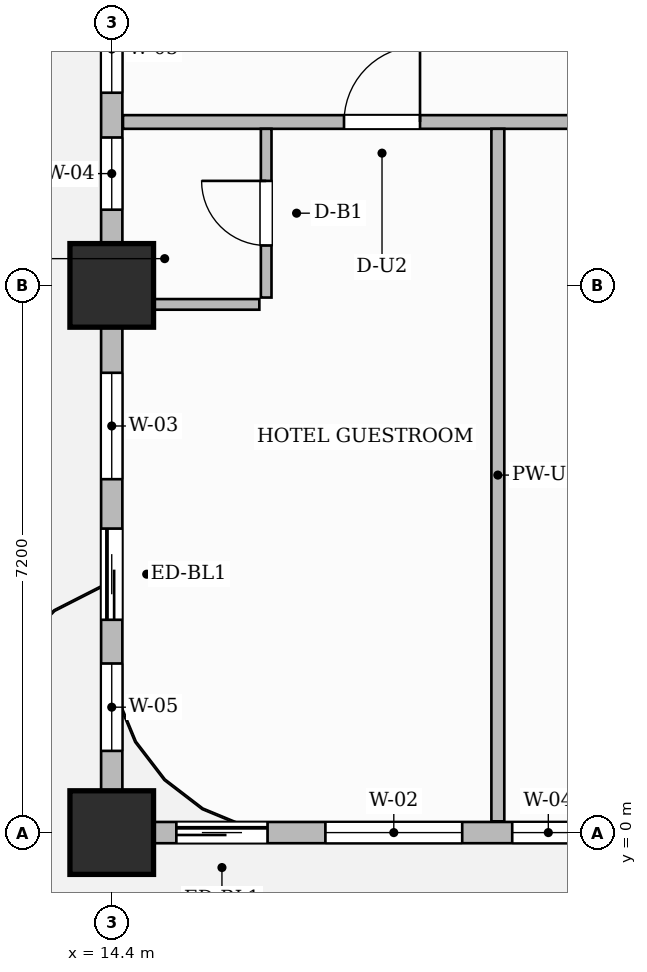
"""IFC4 building model, lengths in metres.
Left out: names, types, materials, properties, quantities, classifications, styles, units other than length and angle.
Written with IfcOpenShell. Run it as: python <this file> out.ifc"""

import sys

from ifc_helpers import new_model, si_unit, direction, frame, frame_2d, origin, origin_2d, place, context, subcontext, project, spatial, rectangle, extrude, source, transform, mapped, element, fill, save


model = new_model("IFC4")
c1 = context("Model", 3, precision=1e-05, world=origin(), true_north=direction((0.0, 1.0)))
c2 = subcontext(c1, "Body", "Model", "MODEL_VIEW")
j1 = project(units=[si_unit("LENGTHUNIT", "METRE"), si_unit("PLANEANGLEUNIT", "RADIAN")], contexts=[c1])
p1 = place(None, origin())
s1 = spatial("IfcSite", under=j1, at=p1, CompositionType="ELEMENT")
p2 = place(p1, origin())
s2 = spatial("IfcBuilding", under=s1, at=p2, CompositionType="ELEMENT")
p3 = place(p2, frame((0.0, 0.0, 80.5)))
s3 = spatial("IfcBuildingStorey", under=s2, at=p3, CompositionType="ELEMENT", Elevation=80.5)
m1 = source(origin(), c2, "Body", "SweptSolid", [
    extrude(rectangle(XDim=1.1, YDim=1.1, at=origin_2d()), origin(), (0.0, 0.0, 1.0), 3.7),
])
for number, where, z_axis, x_axis in (
    (1, (14.4, 0.0, 0.0), (0.0, 0.0, 1.0), (1.0, 0.0, 0.0)),
    (2, (14.4, 7.2, 0.0), (0.0, 0.0, 1.0), (1.0, 0.0, 0.0)),
):
    element("IfcColumn", number, at=place(p3, frame(where, z_axis=z_axis, x_axis=x_axis)), inside=s3, PredefinedType="COLUMN", context=c2, shape_type="MappedRepresentation", body=[
        mapped(m1, transform((0.0, 0.0, 0.0), scale=1.0)),
    ])
p4 = place(p3, frame((14.548, 9.35, 0.0), z_axis=(0.0, 0.0, 1.0), x_axis=(1.0, 0.0, 0.0)))
e3 = element("IfcWall", 3, at=p4, inside=s3, PredefinedType="PARTITIONING", context=c2, shape_type="SweptSolid", body=[
    extrude(rectangle(XDim=15.562, YDim=0.18, at=frame_2d((7.781, 0.0))), origin(), (0.0, 0.0, 1.0), 3.45),
])
p5 = place(p4, frame((2.908, 0.0, 0.0)))
e4 = element("IfcOpeningElement", 4, at=p5, cuts=e3, PredefinedType="OPENING", context=c2, shape_type="SweptSolid", body=[
    extrude(rectangle(XDim=1.0, YDim=2.2, at=frame_2d((0.5, 1.1))), frame((0.0, 0.1, 0.0), z_axis=(0.0, -1.0, 0.0), x_axis=(1.0, 0.0, 0.0)), (0.0, 0.0, 1.0), 0.2),
])
p6 = place(p4, frame((5.985, 0.0, 0.0)))
e5 = element("IfcOpeningElement", 5, at=p6, cuts=e3, PredefinedType="OPENING", context=c2, shape_type="SweptSolid", body=[
    extrude(rectangle(XDim=1.05, YDim=2.25, at=frame_2d((0.525, 1.125))), frame((0.0, 0.1, 0.0), z_axis=(0.0, -1.0, 0.0), x_axis=(1.0, 0.0, 0.0)), (0.0, 0.0, 1.0), 0.2),
])
p7 = place(p4, frame((13.72, 0.0, 0.0)))
e6 = element("IfcOpeningElement", 6, at=p7, cuts=e3, PredefinedType="OPENING", context=c2, shape_type="SweptSolid", body=[
    extrude(rectangle(XDim=1.0, YDim=2.2, at=frame_2d((0.5, 1.1))), frame((0.0, 0.1, 0.0), z_axis=(0.0, -1.0, 0.0), x_axis=(1.0, 0.0, 0.0)), (0.0, 0.0, 1.0), 0.2),
])
p8 = place(p3, frame((19.48, 0.148, 0.0), z_axis=(0.0, 0.0, 1.0), x_axis=(0.0, 1.0, 0.0)))
e7 = element("IfcWall", 7, at=p8, inside=s3, PredefinedType="PARTITIONING", context=c2, shape_type="SweptSolid", body=[
    extrude(rectangle(XDim=9.112, YDim=0.17, at=frame_2d((4.556, 0.0))), origin(), (0.0, 0.0, 1.0), 3.45),
])
p9 = place(p3, frame((16.432, 7.04, 0.0), z_axis=(0.0, 0.0, 1.0), x_axis=(0.0, 1.0, 0.0)))
e8 = element("IfcWall", 8, at=p9, inside=s3, PredefinedType="PARTITIONING", context=c2, shape_type="SweptSolid", body=[
    extrude(rectangle(XDim=2.22, YDim=0.14, at=frame_2d((1.11, 0.0))), origin(), (0.0, 0.0, 1.0), 3.45),
])
p10 = place(p9, frame((0.685, 0.0, 0.0)))
e9 = element("IfcOpeningElement", 9, at=p10, cuts=e8, PredefinedType="OPENING", context=c2, shape_type="SweptSolid", body=[
    extrude(rectangle(XDim=0.85, YDim=2.1, at=frame_2d((0.425, 1.05))), frame((0.0, 0.08, 0.0), z_axis=(0.0, -1.0, 0.0), x_axis=(1.0, 0.0, 0.0)), (0.0, 0.0, 1.0), 0.16),
])
p11 = place(p3, frame((14.49, 6.95, 0.0), z_axis=(0.0, 0.0, 1.0), x_axis=(1.0, 0.0, 0.0)))
e10 = element("IfcWall", 10, at=p11, inside=s3, PredefinedType="PARTITIONING", context=c2, shape_type="SweptSolid", body=[
    extrude(rectangle(XDim=1.852, YDim=0.14, at=frame_2d((0.926, 0.0))), origin(), (0.0, 0.0, 1.0), 2.885),
])
p12 = place(p3, frame((14.4, 0.0, 0.0), z_axis=(0.0, 0.0, 1.0), x_axis=(1.0, 0.0, 0.0)))
e11 = element("IfcWall", 11, at=p12, inside=s3, PredefinedType="SOLIDWALL", context=c2, shape_type="SweptSolid", body=[
    extrude(rectangle(XDim=43.2, YDim=0.28, at=frame_2d((21.6, 0.0))), origin(), (0.0, 0.0, 1.0), 2.885),
])
p13 = place(p12, frame((0.85, 0.0, 0.0)))
e12 = element("IfcOpeningElement", 12, at=p13, cuts=e11, PredefinedType="OPENING", context=c2, shape_type="SweptSolid", body=[
    extrude(rectangle(XDim=1.2, YDim=2.2, at=frame_2d((0.6, 1.1))), frame((0.0, 0.15, 0.0), z_axis=(0.0, -1.0, 0.0), x_axis=(1.0, 0.0, 0.0)), (0.0, 0.0, 1.0), 0.3),
])
p14 = place(p12, frame((2.811, 0.0, 0.8)))
e13 = element("IfcOpeningElement", 13, at=p14, cuts=e11, PredefinedType="OPENING", context=c2, shape_type="SweptSolid", body=[
    extrude(rectangle(XDim=1.8, YDim=1.85, at=frame_2d((0.9, 0.925))), frame((0.0, 0.15, 0.0), z_axis=(0.0, -1.0, 0.0), x_axis=(1.0, 0.0, 0.0)), (0.0, 0.0, 1.0), 0.3),
])
p15 = place(p12, frame((5.269, 0.0, 0.8)))
e14 = element("IfcOpeningElement", 14, at=p15, cuts=e11, PredefinedType="OPENING", context=c2, shape_type="SweptSolid", body=[
    extrude(rectangle(XDim=0.95, YDim=1.75, at=frame_2d((0.475, 0.875))), frame((0.0, 0.15, 0.0), z_axis=(0.0, -1.0, 0.0), x_axis=(1.0, 0.0, 0.0)), (0.0, 0.0, 1.0), 0.3),
])
p16 = place(p12, frame((8.389, 0.0, 0.8)))
e15 = element("IfcOpeningElement", 15, at=p16, cuts=e11, PredefinedType="OPENING", context=c2, shape_type="SweptSolid", body=[
    extrude(rectangle(XDim=1.8, YDim=1.85, at=frame_2d((0.9, 0.925))), frame((0.0, 0.15, 0.0), z_axis=(0.0, -1.0, 0.0), x_axis=(1.0, 0.0, 0.0)), (0.0, 0.0, 1.0), 0.3),
])
p17 = place(p12, frame((11.197, 0.0, 0.8)))
e16 = element("IfcOpeningElement", 16, at=p17, cuts=e11, PredefinedType="OPENING", context=c2, shape_type="SweptSolid", body=[
    extrude(rectangle(XDim=1.8, YDim=1.85, at=frame_2d((0.9, 0.925))), frame((0.0, 0.15, 0.0), z_axis=(0.0, -1.0, 0.0), x_axis=(1.0, 0.0, 0.0)), (0.0, 0.0, 1.0), 0.3),
])
p18 = place(p12, frame((16.804, 0.0, 0.8)))
e17 = element("IfcOpeningElement", 17, at=p18, cuts=e11, PredefinedType="OPENING", context=c2, shape_type="SweptSolid", body=[
    extrude(rectangle(XDim=1.8, YDim=1.85, at=frame_2d((0.9, 0.925))), frame((0.0, 0.15, 0.0), z_axis=(0.0, -1.0, 0.0), x_axis=(1.0, 0.0, 0.0)), (0.0, 0.0, 1.0), 0.3),
])
p19 = place(p12, frame((21.521, 0.0, 0.8)))
e18 = element("IfcOpeningElement", 18, at=p19, cuts=e11, PredefinedType="OPENING", context=c2, shape_type="SweptSolid", body=[
    extrude(rectangle(XDim=0.95, YDim=1.75, at=frame_2d((0.475, 0.875))), frame((0.0, 0.15, 0.0), z_axis=(0.0, -1.0, 0.0), x_axis=(1.0, 0.0, 0.0)), (0.0, 0.0, 1.0), 0.3),
])
p20 = place(p12, frame((23.904, 0.0, 0.8)))
e19 = element("IfcOpeningElement", 19, at=p20, cuts=e11, PredefinedType="OPENING", context=c2, shape_type="SweptSolid", body=[
    extrude(rectangle(XDim=1.8, YDim=1.85, at=frame_2d((0.9, 0.925))), frame((0.0, 0.15, 0.0), z_axis=(0.0, -1.0, 0.0), x_axis=(1.0, 0.0, 0.0)), (0.0, 0.0, 1.0), 0.3),
])
p21 = place(p12, frame((29.681, 0.0, 0.8)))
e20 = element("IfcOpeningElement", 20, at=p21, cuts=e11, PredefinedType="OPENING", context=c2, shape_type="SweptSolid", body=[
    extrude(rectangle(XDim=1.8, YDim=1.85, at=frame_2d((0.9, 0.925))), frame((0.0, 0.15, 0.0), z_axis=(0.0, -1.0, 0.0), x_axis=(1.0, 0.0, 0.0)), (0.0, 0.0, 1.0), 0.3),
])
p22 = place(p12, frame((32.327, 0.0, 0.8)))
e21 = element("IfcOpeningElement", 21, at=p22, cuts=e11, PredefinedType="OPENING", context=c2, shape_type="SweptSolid", body=[
    extrude(rectangle(XDim=1.8, YDim=1.85, at=frame_2d((0.9, 0.925))), frame((0.0, 0.15, 0.0), z_axis=(0.0, -1.0, 0.0), x_axis=(1.0, 0.0, 0.0)), (0.0, 0.0, 1.0), 0.3),
])
p23 = place(p12, frame((36.875, 0.0, 0.8)))
e22 = element("IfcOpeningElement", 22, at=p23, cuts=e11, PredefinedType="OPENING", context=c2, shape_type="SweptSolid", body=[
    extrude(rectangle(XDim=1.8, YDim=1.85, at=frame_2d((0.9, 0.925))), frame((0.0, 0.15, 0.0), z_axis=(0.0, -1.0, 0.0), x_axis=(1.0, 0.0, 0.0)), (0.0, 0.0, 1.0), 0.3),
])
p24 = place(p12, frame((39.925, 0.0, 0.8)))
e23 = element("IfcOpeningElement", 23, at=p24, cuts=e11, PredefinedType="OPENING", context=c2, shape_type="SweptSolid", body=[
    extrude(rectangle(XDim=1.8, YDim=1.85, at=frame_2d((0.9, 0.925))), frame((0.0, 0.15, 0.0), z_axis=(0.0, -1.0, 0.0), x_axis=(1.0, 0.0, 0.0)), (0.0, 0.0, 1.0), 0.3),
])
p25 = place(p3, frame((14.4, 0.05, 0.0), z_axis=(0.0, 0.0, 1.0), x_axis=(0.0, 1.0, 0.0)))
e24 = element("IfcWall", 24, at=p25, inside=s3, PredefinedType="SOLIDWALL", context=c2, shape_type="SweptSolid", body=[
    extrude(rectangle(XDim=20.6, YDim=0.28, at=frame_2d((10.3, 0.0))), origin(), (0.0, 0.0, 1.0), 2.885),
])
p26 = place(p25, frame((2.75, 0.0, 0.0)))
e25 = element("IfcOpeningElement", 25, at=p26, cuts=e24, PredefinedType="OPENING", context=c2, shape_type="SweptSolid", body=[
    extrude(rectangle(XDim=1.2, YDim=2.2, at=frame_2d((0.6, 1.1))), frame((0.0, 0.15, 0.0), z_axis=(0.0, -1.0, 0.0), x_axis=(1.0, 0.0, 0.0)), (0.0, 0.0, 1.0), 0.3),
])
p27 = place(p25, frame((1.025, 0.0, 0.8)))
e26 = element("IfcOpeningElement", 26, at=p27, cuts=e24, PredefinedType="OPENING", context=c2, shape_type="SweptSolid", body=[
    extrude(rectangle(XDim=1.15, YDim=1.8, at=frame_2d((0.575, 0.9))), frame((0.0, 0.15, 0.0), z_axis=(0.0, -1.0, 0.0), x_axis=(1.0, 0.0, 0.0)), (0.0, 0.0, 1.0), 0.3),
])
p28 = place(p25, frame((4.6, 0.0, 0.8)))
e27 = element("IfcOpeningElement", 27, at=p28, cuts=e24, PredefinedType="OPENING", context=c2, shape_type="SweptSolid", body=[
    extrude(rectangle(XDim=1.4, YDim=1.85, at=frame_2d((0.7, 0.925))), frame((0.0, 0.15, 0.0), z_axis=(0.0, -1.0, 0.0), x_axis=(1.0, 0.0, 0.0)), (0.0, 0.0, 1.0), 0.3),
])
p29 = place(p25, frame((8.146, 0.0, 0.8)))
e28 = element("IfcOpeningElement", 28, at=p29, cuts=e24, PredefinedType="OPENING", context=c2, shape_type="SweptSolid", body=[
    extrude(rectangle(XDim=0.95, YDim=1.75, at=frame_2d((0.475, 0.875))), frame((0.0, 0.15, 0.0), z_axis=(0.0, -1.0, 0.0), x_axis=(1.0, 0.0, 0.0)), (0.0, 0.0, 1.0), 0.3),
])
p30 = place(p25, frame((9.685, 0.0, 0.8)))
e29 = element("IfcOpeningElement", 29, at=p30, cuts=e24, PredefinedType="OPENING", context=c2, shape_type="SweptSolid", body=[
    extrude(rectangle(XDim=1.15, YDim=1.8, at=frame_2d((0.575, 0.9))), frame((0.0, 0.15, 0.0), z_axis=(0.0, -1.0, 0.0), x_axis=(1.0, 0.0, 0.0)), (0.0, 0.0, 1.0), 0.3),
])
p31 = place(p25, frame((11.689, 0.0, 0.8)))
e30 = element("IfcOpeningElement", 30, at=p31, cuts=e24, PredefinedType="OPENING", context=c2, shape_type="SweptSolid", body=[
    extrude(rectangle(XDim=1.4, YDim=1.85, at=frame_2d((0.7, 0.925))), frame((0.0, 0.15, 0.0), z_axis=(0.0, -1.0, 0.0), x_axis=(1.0, 0.0, 0.0)), (0.0, 0.0, 1.0), 0.3),
])
p32 = place(p25, frame((16.79, 0.0, 0.8)))
e31 = element("IfcOpeningElement", 31, at=p32, cuts=e24, PredefinedType="OPENING", context=c2, shape_type="SweptSolid", body=[
    extrude(rectangle(XDim=1.8, YDim=1.85, at=frame_2d((0.9, 0.925))), frame((0.0, 0.15, 0.0), z_axis=(0.0, -1.0, 0.0), x_axis=(1.0, 0.0, 0.0)), (0.0, 0.0, 1.0), 0.3),
])
m2 = source(origin(), c2, "Body", "SweptSolid", [
    extrude(rectangle(XDim=0.85, YDim=2.1, at=frame_2d((0.425, 1.05))), frame((0.0, 0.025, 0.0), z_axis=(0.0, -1.0, 0.0), x_axis=(1.0, 0.0, 0.0)), (0.0, 0.0, 1.0), 0.05),
])
p33 = place(p10, origin())
e32 = element("IfcDoor", 32, at=p33, inside=s3, OperationType="SINGLE_SWING_RIGHT", PredefinedType="DOOR", context=c2, shape_type="MappedRepresentation", body=[
    mapped(m2, transform((0.0, 0.0, 0.0), scale=1.0)),
])
fill(e9, e32)
m3 = source(origin(), c2, "Body", "SweptSolid", [
    extrude(rectangle(XDim=1.0, YDim=2.2, at=frame_2d((0.5, 1.1))), frame((0.0, 0.025, 0.0), z_axis=(0.0, -1.0, 0.0), x_axis=(1.0, 0.0, 0.0)), (0.0, 0.0, 1.0), 0.05),
])
p34 = place(p5, origin())
e33 = element("IfcDoor", 33, at=p34, inside=s3, OperationType="SINGLE_SWING_RIGHT", PredefinedType="DOOR", context=c2, shape_type="MappedRepresentation", body=[
    mapped(m3, transform((0.0, 0.0, 0.0), scale=1.0)),
])
fill(e4, e33)
m4 = source(origin(), c2, "Body", "SweptSolid", [
    extrude(rectangle(XDim=1.2, YDim=2.2, at=frame_2d((0.6, 1.1))), frame((0.0, 0.025, 0.0), z_axis=(0.0, -1.0, 0.0), x_axis=(1.0, 0.0, 0.0)), (0.0, 0.0, 1.0), 0.05),
])
p35 = place(p13, origin())
e34 = element("IfcDoor", 34, at=p35, inside=s3, OperationType="SLIDING_TO_LEFT", PredefinedType="DOOR", context=c2, shape_type="MappedRepresentation", body=[
    mapped(m4, transform((0.0, 0.0, 0.0), scale=1.0)),
])
fill(e12, e34)
p36 = place(p26, origin())
e35 = element("IfcDoor", 35, at=p36, inside=s3, OperationType="SLIDING_TO_LEFT", PredefinedType="DOOR", context=c2, shape_type="MappedRepresentation", body=[
    mapped(m4, transform((0.0, 0.0, 0.0), scale=1.0)),
])
fill(e25, e35)
m5 = source(origin(), c2, "Body", "SweptSolid", [
    extrude(rectangle(XDim=1.8, YDim=1.85, at=frame_2d((0.9, 0.925))), frame((0.0, 0.03, 0.0), z_axis=(0.0, -1.0, 0.0), x_axis=(1.0, 0.0, 0.0)), (0.0, 0.0, 1.0), 0.06),
])
p37 = place(p14, origin())
e36 = element("IfcWindow", 36, at=p37, inside=s3, PartitioningType="DOUBLE_PANEL_VERTICAL", PredefinedType="WINDOW", context=c2, shape_type="MappedRepresentation", body=[
    mapped(m5, transform((0.0, 0.0, 0.0), scale=1.0)),
])
fill(e13, e36)
m6 = source(origin(), c2, "Body", "SweptSolid", [
    extrude(rectangle(XDim=0.95, YDim=1.75, at=frame_2d((0.475, 0.875))), frame((0.0, 0.03, 0.0), z_axis=(0.0, -1.0, 0.0), x_axis=(1.0, 0.0, 0.0)), (0.0, 0.0, 1.0), 0.06),
])
p38 = place(p15, origin())
e37 = element("IfcWindow", 37, at=p38, inside=s3, PartitioningType="SINGLE_PANEL", PredefinedType="WINDOW", context=c2, shape_type="MappedRepresentation", body=[
    mapped(m6, transform((0.0, 0.0, 0.0), scale=1.0)),
])
fill(e14, e37)
m7 = source(origin(), c2, "Body", "SweptSolid", [
    extrude(rectangle(XDim=1.15, YDim=1.8, at=frame_2d((0.575, 0.9))), frame((0.0, 0.03, 0.0), z_axis=(0.0, -1.0, 0.0), x_axis=(1.0, 0.0, 0.0)), (0.0, 0.0, 1.0), 0.06),
])
p39 = place(p27, origin())
e38 = element("IfcWindow", 38, at=p39, inside=s3, PartitioningType="SINGLE_PANEL", PredefinedType="WINDOW", context=c2, shape_type="MappedRepresentation", body=[
    mapped(m7, transform((0.0, 0.0, 0.0), scale=1.0)),
])
fill(e26, e38)
m8 = source(origin(), c2, "Body", "SweptSolid", [
    extrude(rectangle(XDim=1.4, YDim=1.85, at=frame_2d((0.7, 0.925))), frame((0.0, 0.03, 0.0), z_axis=(0.0, -1.0, 0.0), x_axis=(1.0, 0.0, 0.0)), (0.0, 0.0, 1.0), 0.06),
])
p40 = place(p28, origin())
e39 = element("IfcWindow", 39, at=p40, inside=s3, PartitioningType="SINGLE_PANEL", PredefinedType="WINDOW", context=c2, shape_type="MappedRepresentation", body=[
    mapped(m8, transform((0.0, 0.0, 0.0), scale=1.0)),
])
fill(e27, e39)
p41 = place(p29, origin())
e40 = element("IfcWindow", 40, at=p41, inside=s3, PartitioningType="SINGLE_PANEL", PredefinedType="WINDOW", context=c2, shape_type="MappedRepresentation", body=[
    mapped(m6, transform((0.0, 0.0, 0.0), scale=1.0)),
])
fill(e28, e40)
p42 = place(p30, origin())
e41 = element("IfcWindow", 41, at=p42, inside=s3, PartitioningType="SINGLE_PANEL", PredefinedType="WINDOW", context=c2, shape_type="MappedRepresentation", body=[
    mapped(m7, transform((0.0, 0.0, 0.0), scale=1.0)),
])
fill(e29, e41)
save(model, sys.argv[1])
